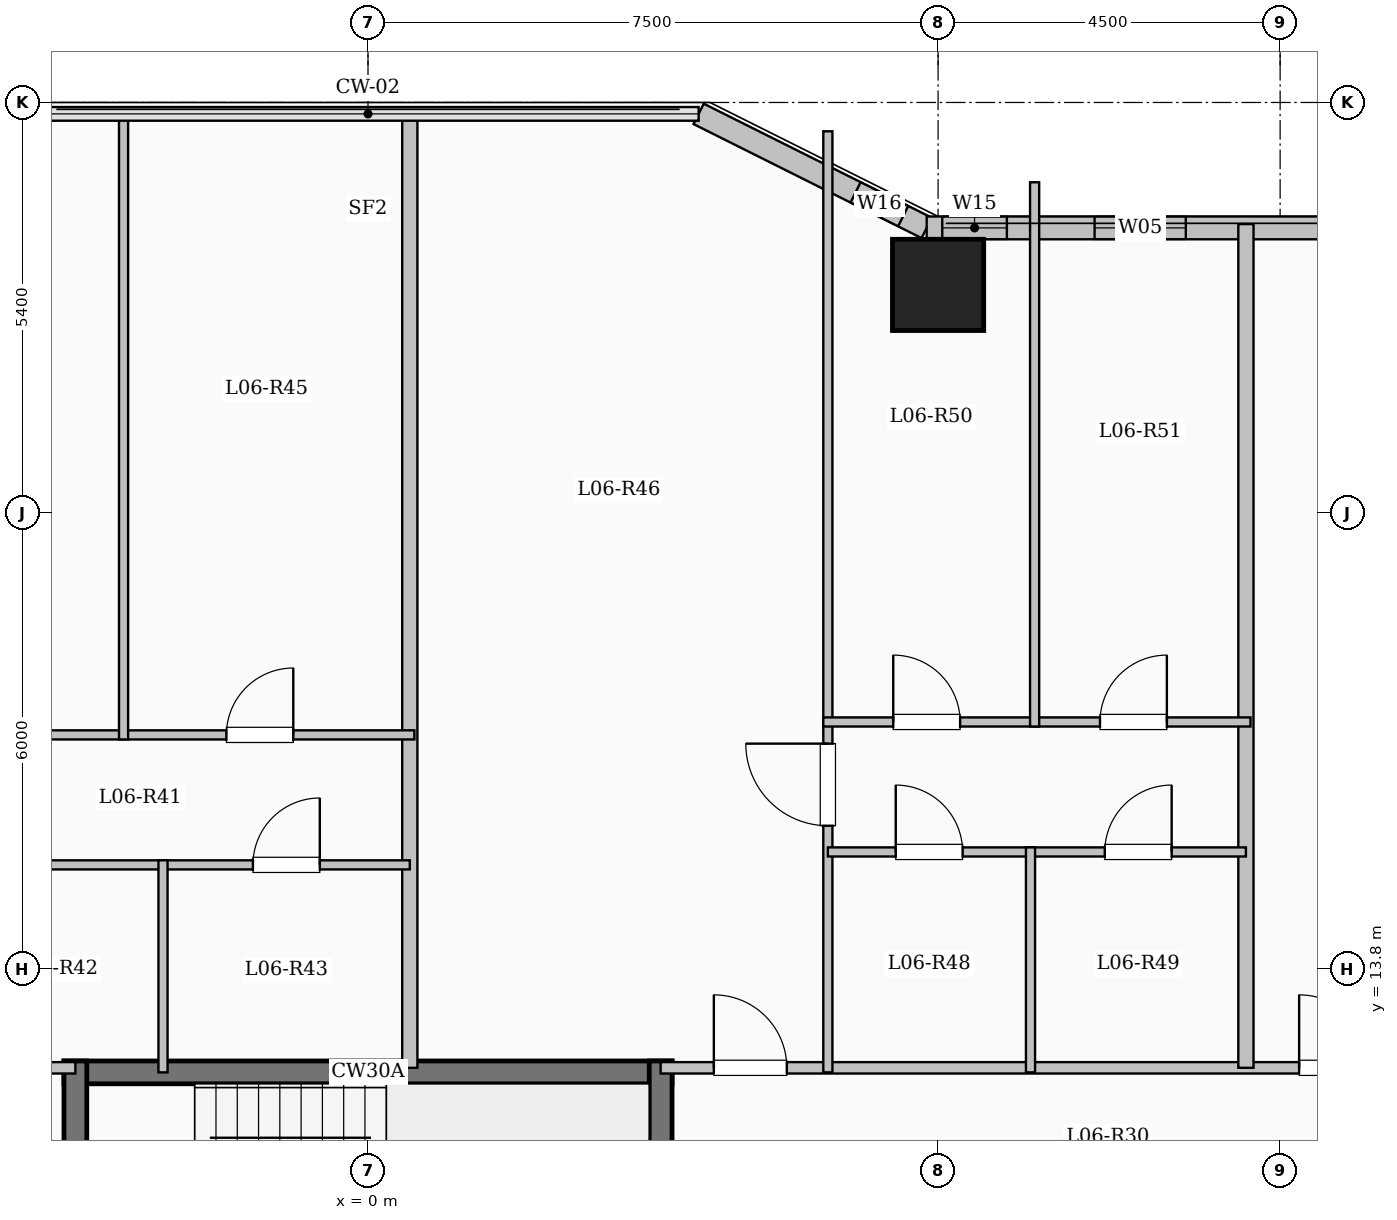
"""IFC4 building model, lengths in metres.
Left out: names, types, materials, properties, quantities, classifications, styles, units other than length and angle.
Written with IfcOpenShell. Run it as: python <this file> out.ifc"""

import sys

from ifc_helpers import new_model, si_unit, direction, frame, frame_2d, origin, origin_2d, place, context, subcontext, project, spatial, rectangle, extrude, element, fill, save


model = new_model("IFC4")
c1 = context("Model", 3, precision=1e-05, world=origin(), true_north=direction((0.0, 1.0)))
c2 = subcontext(c1, "Body", "Model", "MODEL_VIEW")
j1 = project(units=[si_unit("LENGTHUNIT", "METRE"), si_unit("PLANEANGLEUNIT", "RADIAN")], contexts=[c1])
p1 = place(None, origin())
s1 = spatial("IfcSite", under=j1, at=p1, CompositionType="ELEMENT")
p2 = place(p1, origin())
s2 = spatial("IfcBuilding", under=s1, at=p2, CompositionType="ELEMENT")
p3 = place(p2, frame((0.0, 0.0, 27.35)))
s3 = spatial("IfcBuildingStorey", under=s2, at=p3, CompositionType="ELEMENT", Elevation=27.35)
p4 = place(p3, frame((7.5, 22.8, 0.0), z_axis=(0.0, 0.0, 1.0), x_axis=(1.0, 0.0, 0.0)))
e1 = element("IfcColumn", 1, at=p4, inside=s3, PredefinedType="COLUMN", context=c2, shape_type="SweptSolid", body=[
    extrude(rectangle(XDim=1.2, YDim=1.2, at=origin_2d()), origin(), (0.0, 0.0, 1.0), 3.35),
])
p5 = place(p3, frame((4.35, 25.05, 0.0), z_axis=(0.0, 0.0, 1.0), x_axis=(0.894427191, -0.4472135955, 0.0)))
e2 = element("IfcWall", 2, at=p5, inside=s3, PredefinedType="SOLIDWALL", context=c2, shape_type="SweptSolid", body=[
    extrude(rectangle(XDim=3.354, YDim=0.3, at=frame_2d((1.677, 0.0))), origin(), (0.0, 0.0, 1.0), 3.1),
])
p6 = place(p5, frame((2.308, 0.0, 0.95)))
e3 = element("IfcOpeningElement", 3, at=p6, cuts=e2, PredefinedType="OPENING", context=c2, shape_type="SweptSolid", body=[
    extrude(rectangle(XDim=0.7, YDim=1.5, at=frame_2d((0.35, 0.75))), frame((0.0, 0.16, 0.0), z_axis=(0.0, -1.0, 0.0), x_axis=(1.0, 0.0, 0.0)), (0.0, 0.0, 1.0), 0.32),
])
p7 = place(p3, frame((7.35, 23.55, 0.0), z_axis=(0.0, 0.0, 1.0), x_axis=(1.0, 0.0, 0.0)))
e4 = element("IfcWall", 4, at=p7, inside=s3, PredefinedType="SOLIDWALL", context=c2, shape_type="SweptSolid", body=[
    extrude(rectangle(XDim=15.3, YDim=0.3, at=frame_2d((7.65, 0.0))), origin(), (0.0, 0.0, 1.0), 3.1),
])
p8 = place(p7, frame((0.205, 0.0, 0.95)))
e5 = element("IfcOpeningElement", 5, at=p8, cuts=e4, PredefinedType="OPENING", context=c2, shape_type="SweptSolid", body=[
    extrude(rectangle(XDim=0.85, YDim=1.5, at=frame_2d((0.425, 0.75))), frame((0.0, 0.16, 0.0), z_axis=(0.0, -1.0, 0.0), x_axis=(1.0, 0.0, 0.0)), (0.0, 0.0, 1.0), 0.32),
])
p9 = place(p7, frame((2.209, 0.0, 0.95)))
e6 = element("IfcOpeningElement", 6, at=p9, cuts=e4, PredefinedType="OPENING", context=c2, shape_type="SweptSolid", body=[
    extrude(rectangle(XDim=1.2, YDim=1.5, at=frame_2d((0.6, 0.75))), frame((0.0, 0.16, 0.0), z_axis=(0.0, -1.0, 0.0), x_axis=(1.0, 0.0, 0.0)), (0.0, 0.0, 1.0), 0.32),
])
p10 = place(p7, frame((5.196, 0.0, 0.9)))
e7 = element("IfcOpeningElement", 7, at=p10, cuts=e4, PredefinedType="OPENING", context=c2, shape_type="SweptSolid", body=[
    extrude(rectangle(XDim=2.4, YDim=1.8, at=frame_2d((1.2, 0.9))), frame((0.0, 0.16, 0.0), z_axis=(0.0, -1.0, 0.0), x_axis=(1.0, 0.0, 0.0)), (0.0, 0.0, 1.0), 0.32),
])
p11 = place(p7, frame((9.483, 0.0, 0.9)))
e8 = element("IfcOpeningElement", 8, at=p11, cuts=e4, PredefinedType="OPENING", context=c2, shape_type="SweptSolid", body=[
    extrude(rectangle(XDim=1.5, YDim=1.65, at=frame_2d((0.75, 0.825))), frame((0.0, 0.16, 0.0), z_axis=(0.0, -1.0, 0.0), x_axis=(1.0, 0.0, 0.0)), (0.0, 0.0, 1.0), 0.32),
])
p12 = place(p7, frame((12.644, 0.0, 0.9)))
e9 = element("IfcOpeningElement", 9, at=p12, cuts=e4, PredefinedType="OPENING", context=c2, shape_type="SweptSolid", body=[
    extrude(rectangle(XDim=1.8, YDim=1.65, at=frame_2d((0.9, 0.825))), frame((0.0, 0.16, 0.0), z_axis=(0.0, -1.0, 0.0), x_axis=(1.0, 0.0, 0.0)), (0.0, 0.0, 1.0), 0.32),
])
p13 = place(p3, frame((-4.0, 12.44, 0.0), z_axis=(0.0, 0.0, 1.0), x_axis=(1.0, 0.0, 0.0)))
e10 = element("IfcWall", 10, at=p13, inside=s3, PredefinedType="SHEAR", context=c2, shape_type="SweptSolid", body=[
    extrude(rectangle(XDim=8.0, YDim=0.3, at=frame_2d((4.0, 0.0))), origin(), (0.0, 0.0, 1.0), 3.35),
])
for number, where, z_axis, x_axis in (
    (11, (-3.85, 9.0, 0.0), (0.0, 0.0, 1.0), (0.0, 1.0, 0.0)),
    (12, (3.85, 9.0, 0.0), (0.0, 0.0, 1.0), (0.0, 1.0, 0.0)),
):
    element("IfcWall", number, at=place(p3, frame(where, z_axis=z_axis, x_axis=x_axis)), inside=s3, PredefinedType="SHEAR", context=c2, shape_type="SweptSolid", body=[
        extrude(rectangle(XDim=3.59, YDim=0.3, at=frame_2d((1.795, 0.0))), origin(), (0.0, 0.0, 1.0), 3.35),
    ])
p14 = place(p3, frame((-22.55, 12.5, 0.0), z_axis=(0.0, 0.0, 1.0), x_axis=(1.0, 0.0, 0.0)))
e13 = element("IfcWall", 13, at=p14, inside=s3, PredefinedType="PARTITIONING", context=c2, shape_type="SweptSolid", body=[
    extrude(rectangle(XDim=18.7, YDim=0.15, at=frame_2d((9.35, 0.0))), origin(), (0.0, 0.0, 1.0), 3.1),
])
p15 = place(p14, frame((0.7, 0.0, 0.0)))
e14 = element("IfcOpeningElement", 14, at=p15, cuts=e13, PredefinedType="OPENING", context=c2, shape_type="SweptSolid", body=[
    extrude(rectangle(XDim=0.96, YDim=2.15, at=frame_2d((0.48, 1.075))), frame((0.0, 0.085, 0.0), z_axis=(0.0, -1.0, 0.0), x_axis=(1.0, 0.0, 0.0)), (0.0, 0.0, 1.0), 0.17),
])
p16 = place(p14, frame((11.326, 0.0, 0.0)))
e15 = element("IfcOpeningElement", 15, at=p16, cuts=e13, PredefinedType="OPENING", context=c2, shape_type="SweptSolid", body=[
    extrude(rectangle(XDim=0.96, YDim=2.15, at=frame_2d((0.48, 1.075))), frame((0.0, 0.085, 0.0), z_axis=(0.0, -1.0, 0.0), x_axis=(1.0, 0.0, 0.0)), (0.0, 0.0, 1.0), 0.17),
])
p17 = place(p3, frame((3.85, 12.5, 0.0), z_axis=(0.0, 0.0, 1.0), x_axis=(1.0, 0.0, 0.0)))
e16 = element("IfcWall", 16, at=p17, inside=s3, PredefinedType="PARTITIONING", context=c2, shape_type="SweptSolid", body=[
    extrude(rectangle(XDim=18.7, YDim=0.15, at=frame_2d((9.35, 0.0))), origin(), (0.0, 0.0, 1.0), 3.1),
])
p18 = place(p17, frame((0.7, 0.0, 0.0)))
e17 = element("IfcOpeningElement", 17, at=p18, cuts=e16, PredefinedType="OPENING", context=c2, shape_type="SweptSolid", body=[
    extrude(rectangle(XDim=0.96, YDim=2.15, at=frame_2d((0.48, 1.075))), frame((0.0, 0.085, 0.0), z_axis=(0.0, -1.0, 0.0), x_axis=(1.0, 0.0, 0.0)), (0.0, 0.0, 1.0), 0.17),
])
p19 = place(p17, frame((8.4, 0.0, 0.0)))
e18 = element("IfcOpeningElement", 18, at=p19, cuts=e16, PredefinedType="OPENING", context=c2, shape_type="SweptSolid", body=[
    extrude(rectangle(XDim=0.96, YDim=2.15, at=frame_2d((0.48, 1.075))), frame((0.0, 0.085, 0.0), z_axis=(0.0, -1.0, 0.0), x_axis=(1.0, 0.0, 0.0)), (0.0, 0.0, 1.0), 0.17),
])
p20 = place(p3, frame((0.55, 12.5, 0.0), z_axis=(0.0, 0.0, 1.0), x_axis=(0.0, 1.0, 0.0)))
e19 = element("IfcWall", 19, at=p20, inside=s3, PredefinedType="SOLIDWALL", context=c2, shape_type="SweptSolid", body=[
    extrude(rectangle(XDim=12.58, YDim=0.2, at=frame_2d((6.29, 0.0))), origin(), (0.0, 0.0, 1.0), 3.1),
])
p21 = place(p3, frame((-6.922, 15.17, 0.0), z_axis=(0.0, 0.0, 1.0), x_axis=(1.0, 0.0, 0.0)))
e20 = element("IfcWall", 20, at=p21, inside=s3, PredefinedType="PARTITIONING", context=c2, shape_type="SweptSolid", body=[
    extrude(rectangle(XDim=4.225, YDim=0.12, at=frame_2d((2.113, 0.0))), origin(), (0.0, 0.0, 1.0), 3.1),
])
p22 = place(p21, frame((1.672, 0.0, 0.0)))
e21 = element("IfcOpeningElement", 21, at=p22, cuts=e20, PredefinedType="OPENING", context=c2, shape_type="SweptSolid", body=[
    extrude(rectangle(XDim=0.88, YDim=2.1, at=frame_2d((0.44, 1.05))), frame((0.0, 0.07, 0.0), z_axis=(0.0, -1.0, 0.0), x_axis=(1.0, 0.0, 0.0)), (0.0, 0.0, 1.0), 0.14),
])
p23 = place(p3, frame((-2.697, 15.17, 0.0), z_axis=(0.0, 0.0, 1.0), x_axis=(1.0, 0.0, 0.0)))
e22 = element("IfcWall", 22, at=p23, inside=s3, PredefinedType="PARTITIONING", context=c2, shape_type="SweptSolid", body=[
    extrude(rectangle(XDim=3.247, YDim=0.12, at=frame_2d((1.624, 0.0))), origin(), (0.0, 0.0, 1.0), 3.1),
])
p24 = place(p23, frame((1.183, 0.0, 0.0)))
e23 = element("IfcOpeningElement", 23, at=p24, cuts=e22, PredefinedType="OPENING", context=c2, shape_type="SweptSolid", body=[
    extrude(rectangle(XDim=0.88, YDim=2.1, at=frame_2d((0.44, 1.05))), frame((0.0, 0.07, 0.0), z_axis=(0.0, -1.0, 0.0), x_axis=(1.0, 0.0, 0.0)), (0.0, 0.0, 1.0), 0.14),
])
p25 = place(p3, frame((-6.982, 16.88, 0.0), z_axis=(0.0, 0.0, 1.0), x_axis=(1.0, 0.0, 0.0)))
e24 = element("IfcWall", 24, at=p25, inside=s3, PredefinedType="PARTITIONING", context=c2, shape_type="SweptSolid", body=[
    extrude(rectangle(XDim=7.592, YDim=0.12, at=frame_2d((3.796, 0.0))), origin(), (0.0, 0.0, 1.0), 3.1),
])
p26 = place(p25, frame((1.413, 0.0, 0.0)))
e25 = element("IfcOpeningElement", 25, at=p26, cuts=e24, PredefinedType="OPENING", context=c2, shape_type="SweptSolid", body=[
    extrude(rectangle(XDim=0.88, YDim=2.1, at=frame_2d((0.44, 1.05))), frame((0.0, 0.07, 0.0), z_axis=(0.0, -1.0, 0.0), x_axis=(1.0, 0.0, 0.0)), (0.0, 0.0, 1.0), 0.14),
])
p27 = place(p25, frame((5.119, 0.0, 0.0)))
e26 = element("IfcOpeningElement", 26, at=p27, cuts=e24, PredefinedType="OPENING", context=c2, shape_type="SweptSolid", body=[
    extrude(rectangle(XDim=0.88, YDim=2.1, at=frame_2d((0.44, 1.05))), frame((0.0, 0.07, 0.0), z_axis=(0.0, -1.0, 0.0), x_axis=(1.0, 0.0, 0.0)), (0.0, 0.0, 1.0), 0.14),
])
p28 = place(p3, frame((-2.697, 12.44, 0.0), z_axis=(0.0, 0.0, 1.0), x_axis=(0.0, 1.0, 0.0)))
e27 = element("IfcWall", 27, at=p28, inside=s3, PredefinedType="PARTITIONING", context=c2, shape_type="SweptSolid", body=[
    extrude(rectangle(XDim=2.79, YDim=0.12, at=frame_2d((1.395, 0.0))), origin(), (0.0, 0.0, 1.0), 3.1),
])
p29 = place(p3, frame((-3.216, 16.82, 0.0), z_axis=(0.0, 0.0, 1.0), x_axis=(0.0, 1.0, 0.0)))
e28 = element("IfcWall", 28, at=p29, inside=s3, PredefinedType="PARTITIONING", context=c2, shape_type="SweptSolid", body=[
    extrude(rectangle(XDim=8.26, YDim=0.12, at=frame_2d((4.13, 0.0))), origin(), (0.0, 0.0, 1.0), 3.1),
])
p30 = place(p3, frame((11.55, 12.5, 0.0), z_axis=(0.0, 0.0, 1.0), x_axis=(0.0, 1.0, 0.0)))
e29 = element("IfcWall", 29, at=p30, inside=s3, PredefinedType="SOLIDWALL", context=c2, shape_type="SweptSolid", body=[
    extrude(rectangle(XDim=11.1, YDim=0.2, at=frame_2d((5.55, 0.0))), origin(), (0.0, 0.0, 1.0), 3.1),
])
p31 = place(p3, frame((6.05, 12.44, 0.0), z_axis=(0.0, 0.0, 1.0), x_axis=(0.0, 1.0, 0.0)))
e30 = element("IfcWall", 30, at=p31, inside=s3, PredefinedType="PARTITIONING", context=c2, shape_type="SweptSolid", body=[
    extrude(rectangle(XDim=12.381, YDim=0.12, at=frame_2d((6.19, 0.0))), origin(), (0.0, 0.0, 1.0), 3.1),
])
p32 = place(p31, frame((3.245, 0.0, 0.0)))
e31 = element("IfcOpeningElement", 31, at=p32, cuts=e30, PredefinedType="OPENING", context=c2, shape_type="SweptSolid", body=[
    extrude(rectangle(XDim=1.08, YDim=2.15, at=frame_2d((0.54, 1.075))), frame((0.0, 0.07, 0.0), z_axis=(0.0, -1.0, 0.0), x_axis=(1.0, 0.0, 0.0)), (0.0, 0.0, 1.0), 0.14),
])
p33 = place(p3, frame((6.05, 15.34, 0.0), z_axis=(0.0, 0.0, 1.0), x_axis=(1.0, 0.0, 0.0)))
e32 = element("IfcWall", 32, at=p33, inside=s3, PredefinedType="PARTITIONING", context=c2, shape_type="SweptSolid", body=[
    extrude(rectangle(XDim=2.666, YDim=0.12, at=frame_2d((1.333, 0.0))), origin(), (0.0, 0.0, 1.0), 3.1),
])
p34 = place(p33, frame((0.893, 0.0, 0.0)))
e33 = element("IfcOpeningElement", 33, at=p34, cuts=e32, PredefinedType="OPENING", context=c2, shape_type="SweptSolid", body=[
    extrude(rectangle(XDim=0.88, YDim=2.1, at=frame_2d((0.44, 1.05))), frame((0.0, 0.07, 0.0), z_axis=(0.0, -1.0, 0.0), x_axis=(1.0, 0.0, 0.0)), (0.0, 0.0, 1.0), 0.14),
])
p35 = place(p3, frame((8.716, 15.34, 0.0), z_axis=(0.0, 0.0, 1.0), x_axis=(1.0, 0.0, 0.0)))
e34 = element("IfcWall", 34, at=p35, inside=s3, PredefinedType="PARTITIONING", context=c2, shape_type="SweptSolid", body=[
    extrude(rectangle(XDim=2.834, YDim=0.12, at=frame_2d((1.417, 0.0))), origin(), (0.0, 0.0, 1.0), 3.1),
])
p36 = place(p35, frame((0.977, 0.0, 0.0)))
e35 = element("IfcOpeningElement", 35, at=p36, cuts=e34, PredefinedType="OPENING", context=c2, shape_type="SweptSolid", body=[
    extrude(rectangle(XDim=0.88, YDim=2.1, at=frame_2d((0.44, 1.05))), frame((0.0, 0.07, 0.0), z_axis=(0.0, -1.0, 0.0), x_axis=(1.0, 0.0, 0.0)), (0.0, 0.0, 1.0), 0.14),
])
p37 = place(p3, frame((5.99, 17.05, 0.0), z_axis=(0.0, 0.0, 1.0), x_axis=(1.0, 0.0, 0.0)))
e36 = element("IfcWall", 36, at=p37, inside=s3, PredefinedType="PARTITIONING", context=c2, shape_type="SweptSolid", body=[
    extrude(rectangle(XDim=5.62, YDim=0.12, at=frame_2d((2.81, 0.0))), origin(), (0.0, 0.0, 1.0), 3.1),
])
p38 = place(p37, frame((0.92, 0.0, 0.0)))
e37 = element("IfcOpeningElement", 37, at=p38, cuts=e36, PredefinedType="OPENING", context=c2, shape_type="SweptSolid", body=[
    extrude(rectangle(XDim=0.88, YDim=2.1, at=frame_2d((0.44, 1.05))), frame((0.0, 0.07, 0.0), z_axis=(0.0, -1.0, 0.0), x_axis=(1.0, 0.0, 0.0)), (0.0, 0.0, 1.0), 0.14),
])
p39 = place(p37, frame((3.64, 0.0, 0.0)))
e38 = element("IfcOpeningElement", 38, at=p39, cuts=e36, PredefinedType="OPENING", context=c2, shape_type="SweptSolid", body=[
    extrude(rectangle(XDim=0.88, YDim=2.1, at=frame_2d((0.44, 1.05))), frame((0.0, 0.07, 0.0), z_axis=(0.0, -1.0, 0.0), x_axis=(1.0, 0.0, 0.0)), (0.0, 0.0, 1.0), 0.14),
])
p40 = place(p3, frame((8.716, 12.44, 0.0), z_axis=(0.0, 0.0, 1.0), x_axis=(0.0, 1.0, 0.0)))
e39 = element("IfcWall", 39, at=p40, inside=s3, PredefinedType="PARTITIONING", context=c2, shape_type="SweptSolid", body=[
    extrude(rectangle(XDim=2.96, YDim=0.12, at=frame_2d((1.48, 0.0))), origin(), (0.0, 0.0, 1.0), 3.1),
])
p41 = place(p3, frame((8.77, 16.99, 0.0), z_axis=(0.0, 0.0, 1.0), x_axis=(0.0, 1.0, 0.0)))
e40 = element("IfcWall", 40, at=p41, inside=s3, PredefinedType="PARTITIONING", context=c2, shape_type="SweptSolid", body=[
    extrude(rectangle(XDim=7.16, YDim=0.12, at=frame_2d((3.58, 0.0))), origin(), (0.0, 0.0, 1.0), 3.1),
])
p42 = place(p6, origin())
e41 = element("IfcWindow", 41, at=p42, inside=s3, PartitioningType="SINGLE_PANEL", PredefinedType="WINDOW", context=c2, shape_type="SweptSolid", body=[
    extrude(rectangle(XDim=0.7, YDim=1.5, at=frame_2d((0.35, 0.75))), frame((0.0, 0.03, 0.0), z_axis=(0.0, -1.0, 0.0), x_axis=(1.0, 0.0, 0.0)), (0.0, 0.0, 1.0), 0.06),
])
fill(e3, e41)
p43 = place(p8, origin())
e42 = element("IfcWindow", 42, at=p43, inside=s3, PartitioningType="SINGLE_PANEL", PredefinedType="WINDOW", context=c2, shape_type="SweptSolid", body=[
    extrude(rectangle(XDim=0.85, YDim=1.5, at=frame_2d((0.425, 0.75))), frame((0.0, 0.03, 0.0), z_axis=(0.0, -1.0, 0.0), x_axis=(1.0, 0.0, 0.0)), (0.0, 0.0, 1.0), 0.06),
])
fill(e5, e42)
p44 = place(p9, origin())
e43 = element("IfcWindow", 43, at=p44, inside=s3, PartitioningType="SINGLE_PANEL", PredefinedType="WINDOW", context=c2, shape_type="SweptSolid", body=[
    extrude(rectangle(XDim=1.2, YDim=1.5, at=frame_2d((0.6, 0.75))), frame((0.0, 0.03, 0.0), z_axis=(0.0, -1.0, 0.0), x_axis=(1.0, 0.0, 0.0)), (0.0, 0.0, 1.0), 0.06),
])
fill(e6, e43)
p45 = place(p24, origin())
e44 = element("IfcDoor", 44, at=p45, inside=s3, OperationType="SINGLE_SWING_RIGHT", PredefinedType="DOOR", context=c2, shape_type="SweptSolid", body=[
    extrude(rectangle(XDim=0.88, YDim=2.1, at=frame_2d((0.44, 1.05))), frame((0.0, 0.025, 0.0), z_axis=(0.0, -1.0, 0.0), x_axis=(1.0, 0.0, 0.0)), (0.0, 0.0, 1.0), 0.05),
])
fill(e23, e44)
p46 = place(p27, origin())
e45 = element("IfcDoor", 45, at=p46, inside=s3, OperationType="SINGLE_SWING_RIGHT", PredefinedType="DOOR", context=c2, shape_type="SweptSolid", body=[
    extrude(rectangle(XDim=0.88, YDim=2.1, at=frame_2d((0.44, 1.05))), frame((0.0, 0.025, 0.0), z_axis=(0.0, -1.0, 0.0), x_axis=(1.0, 0.0, 0.0)), (0.0, 0.0, 1.0), 0.05),
])
fill(e26, e45)
p47 = place(p18, origin())
e46 = element("IfcDoor", 46, at=p47, inside=s3, OperationType="SINGLE_SWING_LEFT", PredefinedType="DOOR", context=c2, shape_type="SweptSolid", body=[
    extrude(rectangle(XDim=0.96, YDim=2.15, at=frame_2d((0.48, 1.075))), frame((0.0, 0.025, 0.0), z_axis=(0.0, -1.0, 0.0), x_axis=(1.0, 0.0, 0.0)), (0.0, 0.0, 1.0), 0.05),
])
fill(e17, e46)
p48 = place(p32, origin())
e47 = element("IfcDoor", 47, at=p48, inside=s3, OperationType="SINGLE_SWING_RIGHT", PredefinedType="DOOR", context=c2, shape_type="SweptSolid", body=[
    extrude(rectangle(XDim=1.08, YDim=2.15, at=frame_2d((0.54, 1.075))), frame((0.0, 0.025, 0.0), z_axis=(0.0, -1.0, 0.0), x_axis=(1.0, 0.0, 0.0)), (0.0, 0.0, 1.0), 0.05),
])
fill(e31, e47)
p49 = place(p34, origin())
e48 = element("IfcDoor", 48, at=p49, inside=s3, OperationType="SINGLE_SWING_LEFT", PredefinedType="DOOR", context=c2, shape_type="SweptSolid", body=[
    extrude(rectangle(XDim=0.88, YDim=2.1, at=frame_2d((0.44, 1.05))), frame((0.0, 0.025, 0.0), z_axis=(0.0, -1.0, 0.0), x_axis=(1.0, 0.0, 0.0)), (0.0, 0.0, 1.0), 0.05),
])
fill(e33, e48)
p50 = place(p36, origin())
e49 = element("IfcDoor", 49, at=p50, inside=s3, OperationType="SINGLE_SWING_RIGHT", PredefinedType="DOOR", context=c2, shape_type="SweptSolid", body=[
    extrude(rectangle(XDim=0.88, YDim=2.1, at=frame_2d((0.44, 1.05))), frame((0.0, 0.025, 0.0), z_axis=(0.0, -1.0, 0.0), x_axis=(1.0, 0.0, 0.0)), (0.0, 0.0, 1.0), 0.05),
])
fill(e35, e49)
p51 = place(p38, origin())
e50 = element("IfcDoor", 50, at=p51, inside=s3, OperationType="SINGLE_SWING_LEFT", PredefinedType="DOOR", context=c2, shape_type="SweptSolid", body=[
    extrude(rectangle(XDim=0.88, YDim=2.1, at=frame_2d((0.44, 1.05))), frame((0.0, 0.025, 0.0), z_axis=(0.0, -1.0, 0.0), x_axis=(1.0, 0.0, 0.0)), (0.0, 0.0, 1.0), 0.05),
])
fill(e37, e50)
p52 = place(p39, origin())
e51 = element("IfcDoor", 51, at=p52, inside=s3, OperationType="SINGLE_SWING_RIGHT", PredefinedType="DOOR", context=c2, shape_type="SweptSolid", body=[
    extrude(rectangle(XDim=0.88, YDim=2.1, at=frame_2d((0.44, 1.05))), frame((0.0, 0.025, 0.0), z_axis=(0.0, -1.0, 0.0), x_axis=(1.0, 0.0, 0.0)), (0.0, 0.0, 1.0), 0.05),
])
fill(e38, e51)
p53 = place(p19, origin())
e52 = element("IfcDoor", 52, at=p53, inside=s3, OperationType="SINGLE_SWING_LEFT", PredefinedType="DOOR", context=c2, shape_type="SweptSolid", body=[
    extrude(rectangle(XDim=0.96, YDim=2.15, at=frame_2d((0.48, 1.075))), frame((0.0, 0.025, 0.0), z_axis=(0.0, -1.0, 0.0), x_axis=(1.0, 0.0, 0.0)), (0.0, 0.0, 1.0), 0.05),
])
fill(e18, e52)
save(model, sys.argv[1])
